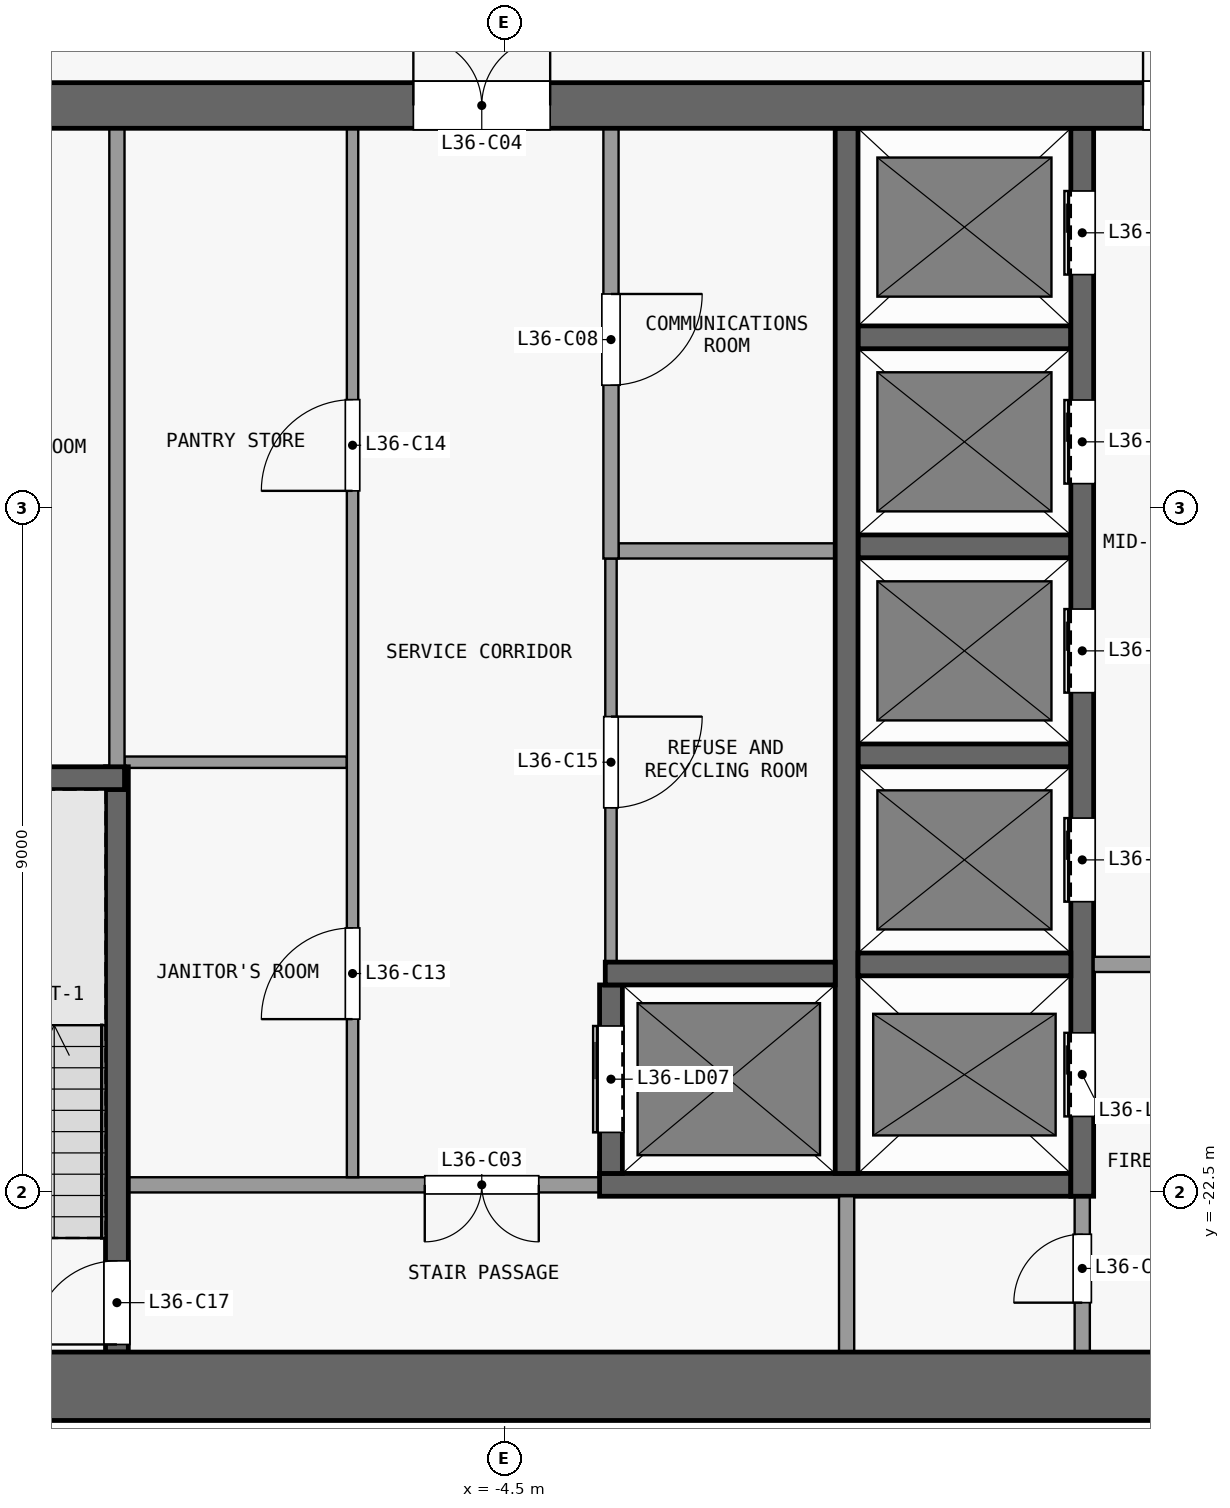
"""IFC4 building model, lengths in metres.
Left out: names, types, materials, properties, quantities, classifications, styles, units other than length and angle.
Written with IfcOpenShell. Run it as: python <this file> out.ifc"""

import sys

from ifc_helpers import new_model, si_unit, direction, frame, frame_2d, origin, place, context, subcontext, project, spatial, rectangle, extrude, element, fill, save


model = new_model("IFC4")
c1 = context("Model", 3, precision=1e-05, world=origin(), true_north=direction((0.0, 1.0)))
c2 = subcontext(c1, "Body", "Model", "MODEL_VIEW")
j1 = project(units=[si_unit("LENGTHUNIT", "METRE"), si_unit("PLANEANGLEUNIT", "RADIAN")], contexts=[c1])
p1 = place(None, origin())
s1 = spatial("IfcSite", under=j1, at=p1, CompositionType="ELEMENT")
p2 = place(p1, origin())
s2 = spatial("IfcBuilding", under=s1, at=p2, CompositionType="ELEMENT")
p3 = place(p2, frame((0.0, 0.0, 149.3)))
s3 = spatial("IfcBuildingStorey", under=s2, at=p3, CompositionType="ELEMENT", Elevation=149.3)
p4 = place(p3, frame((-13.3, -25.05, 0.0), z_axis=(0.0, 0.0, 1.0), x_axis=(1.0, 0.0, 0.0)))
e1 = element("IfcWall", 1, at=p4, inside=s3, PredefinedType="SHEAR", context=c2, shape_type="SweptSolid", body=[
    extrude(rectangle(XDim=26.6, YDim=0.9, at=frame_2d((13.3, 0.0))), origin(), (0.0, 0.0, 1.0), 3.3),
])
p5 = place(p3, frame((-13.3, -8.2, 0.0), z_axis=(0.0, 0.0, 1.0), x_axis=(1.0, 0.0, 0.0)))
e2 = element("IfcWall", 2, at=p5, inside=s3, PredefinedType="SHEAR", context=c2, shape_type="SweptSolid", body=[
    extrude(rectangle(XDim=26.6, YDim=0.6, at=frame_2d((13.3, 0.0))), origin(), (0.0, 0.0, 1.0), 3.3),
])
p6 = place(p5, frame((7.6, 0.0, 0.0)))
e3 = element("IfcOpeningElement", 3, at=p6, cuts=e2, PredefinedType="OPENING", context=c2, shape_type="SweptSolid", body=[
    extrude(rectangle(XDim=1.8, YDim=2.1, at=frame_2d((0.9, 1.05))), frame((0.0, 0.31, 0.0), z_axis=(0.0, -1.0, 0.0), x_axis=(1.0, 0.0, 0.0)), (0.0, 0.0, 1.0), 0.62),
])
p7 = place(p5, frame((17.2, 0.0, 0.0)))
e4 = element("IfcOpeningElement", 4, at=p7, cuts=e2, PredefinedType="OPENING", context=c2, shape_type="SweptSolid", body=[
    extrude(rectangle(XDim=1.8, YDim=2.1, at=frame_2d((0.9, 1.05))), frame((0.0, 0.31, 0.0), z_axis=(0.0, -1.0, 0.0), x_axis=(1.0, 0.0, 0.0)), (0.0, 0.0, 1.0), 0.62),
])
p8 = place(p5, frame((1.525, 0.0, 0.0)))
e5 = element("IfcOpeningElement", 5, at=p8, cuts=e2, PredefinedType="OPENING", context=c2, shape_type="SweptSolid", body=[
    extrude(rectangle(XDim=1.2, YDim=2.1, at=frame_2d((0.6, 1.05))), frame((0.0, 0.31, 0.0), z_axis=(0.0, -1.0, 0.0), x_axis=(1.0, 0.0, 0.0)), (0.0, 0.0, 1.0), 0.62),
])
p9 = place(p5, frame((23.175, 0.0, 0.0)))
e6 = element("IfcOpeningElement", 6, at=p9, cuts=e2, PredefinedType="OPENING", context=c2, shape_type="SweptSolid", body=[
    extrude(rectangle(XDim=0.9, YDim=2.1, at=frame_2d((0.45, 1.05))), frame((0.0, 0.31, 0.0), z_axis=(0.0, -1.0, 0.0), x_axis=(1.0, 0.0, 0.0)), (0.0, 0.0, 1.0), 0.62),
])
p10 = place(p3, frame((-3.25, -22.4, 0.0), z_axis=(0.0, 0.0, 1.0), x_axis=(-1.0, 0.0, 0.0)))
e7 = element("IfcWall", 7, at=p10, inside=s3, PredefinedType="PARTITIONING", context=c2, shape_type="SweptSolid", body=[
    extrude(rectangle(XDim=6.2, YDim=0.2, at=frame_2d((3.1, 0.0))), origin(), (0.0, 0.0, 1.0), 3.3),
])
p11 = place(p10, frame((0.8, 0.0, 0.0)))
e8 = element("IfcOpeningElement", 8, at=p11, cuts=e7, PredefinedType="OPENING", context=c2, shape_type="SweptSolid", body=[
    extrude(rectangle(XDim=1.5, YDim=2.1, at=frame_2d((0.75, 1.05))), frame((0.0, 0.11, 0.0), z_axis=(0.0, -1.0, 0.0), x_axis=(1.0, 0.0, 0.0)), (0.0, 0.0, 1.0), 0.22),
])
p12 = place(p3, frame((-3.25, -22.4, 0.0), z_axis=(0.0, 0.0, 1.0), x_axis=(1.0, 0.0, 0.0)))
e9 = element("IfcWall", 9, at=p12, inside=s3, PredefinedType="SHEAR", context=c2, shape_type="SweptSolid", body=[
    extrude(rectangle(XDim=6.2, YDim=0.3, at=frame_2d((3.1, 0.0))), origin(), (0.0, 0.0, 1.0), 3.3),
])
p13 = place(p3, frame((-3.175, -19.62, 0.0), z_axis=(0.0, 0.0, 1.0), x_axis=(1.0, 0.0, 0.0)))
e10 = element("IfcWall", 10, at=p13, inside=s3, PredefinedType="SHEAR", context=c2, shape_type="SweptSolid", body=[
    extrude(rectangle(XDim=3.025, YDim=0.3, at=frame_2d((1.513, 0.0))), origin(), (0.0, 0.0, 1.0), 3.3),
])
p14 = place(p3, frame((0.15, -19.5, 0.0), z_axis=(0.0, 0.0, 1.0), x_axis=(1.0, 0.0, 0.0)))
e11 = element("IfcWall", 11, at=p14, inside=s3, PredefinedType="SHEAR", context=c2, shape_type="SweptSolid", body=[
    extrude(rectangle(XDim=2.8, YDim=0.3, at=frame_2d((1.4, 0.0))), origin(), (0.0, 0.0, 1.0), 3.3),
])
p15 = place(p3, frame((6.575, -19.5, 0.0), z_axis=(0.0, 0.0, 1.0), x_axis=(-1.0, 0.0, 0.0)))
e12 = element("IfcWall", 12, at=p15, inside=s3, PredefinedType="PARTITIONING", context=c2, shape_type="SweptSolid", body=[
    extrude(rectangle(XDim=3.325, YDim=0.2, at=frame_2d((1.663, 0.0))), origin(), (0.0, 0.0, 1.0), 3.3),
])
p16 = place(p15, frame((1.025, 0.0, 0.0)))
e13 = element("IfcOpeningElement", 13, at=p16, cuts=e12, PredefinedType="OPENING", context=c2, shape_type="SweptSolid", body=[
    extrude(rectangle(XDim=1.5, YDim=2.1, at=frame_2d((0.75, 1.05))), frame((0.0, 0.11, 0.0), z_axis=(0.0, -1.0, 0.0), x_axis=(1.0, 0.0, 0.0)), (0.0, 0.0, 1.0), 0.22),
])
p17 = place(p3, frame((-12.6, -17.05, 0.0), z_axis=(0.0, 0.0, 1.0), x_axis=(1.0, 0.0, 0.0)))
e14 = element("IfcWall", 14, at=p17, inside=s3, PredefinedType="SHEAR", context=c2, shape_type="SweptSolid", body=[
    extrude(rectangle(XDim=3.1, YDim=0.3, at=frame_2d((1.55, 0.0))), origin(), (0.0, 0.0, 1.0), 3.3),
])
p18 = place(p3, frame((-9.5, -16.84, 0.0), z_axis=(0.0, 0.0, 1.0), x_axis=(1.0, 0.0, 0.0)))
e15 = element("IfcWall", 15, at=p18, inside=s3, PredefinedType="PARTITIONING", context=c2, shape_type="SweptSolid", body=[
    extrude(rectangle(XDim=2.925, YDim=0.15, at=frame_2d((1.462, 0.0))), origin(), (0.0, 0.0, 1.0), 3.3),
])
p19 = place(p3, frame((0.15, -16.75, 0.0), z_axis=(0.0, 0.0, 1.0), x_axis=(1.0, 0.0, 0.0)))
e16 = element("IfcWall", 16, at=p19, inside=s3, PredefinedType="SHEAR", context=c2, shape_type="SweptSolid", body=[
    extrude(rectangle(XDim=2.8, YDim=0.3, at=frame_2d((1.4, 0.0))), origin(), (0.0, 0.0, 1.0), 3.3),
])
p20 = place(p3, frame((-3.0, -14.06, 0.0), z_axis=(0.0, 0.0, 1.0), x_axis=(1.0, 0.0, 0.0)))
e17 = element("IfcWall", 17, at=p20, inside=s3, PredefinedType="PARTITIONING", context=c2, shape_type="SweptSolid", body=[
    extrude(rectangle(XDim=2.85, YDim=0.2, at=frame_2d((1.425, 0.0))), origin(), (0.0, 0.0, 1.0), 3.3),
])
for number, where, z_axis, x_axis in (
    (18, (0.15, -14.0, 0.0), (0.0, 0.0, 1.0), (1.0, 0.0, 0.0)),
    (19, (0.15, -11.25, 0.0), (0.0, 0.0, 1.0), (1.0, 0.0, 0.0)),
):
    element("IfcWall", number, at=place(p3, frame(where, z_axis=z_axis, x_axis=x_axis)), inside=s3, PredefinedType="SHEAR", context=c2, shape_type="SweptSolid", body=[
        extrude(rectangle(XDim=2.8, YDim=0.3, at=frame_2d((1.4, 0.0))), origin(), (0.0, 0.0, 1.0), 3.3),
    ])
p21 = place(p3, frame((-9.6, -24.6, 0.0), z_axis=(0.0, 0.0, 1.0), x_axis=(0.0, 1.0, 0.0)))
e20 = element("IfcWall", 20, at=p21, inside=s3, PredefinedType="SHEAR", context=c2, shape_type="SweptSolid", body=[
    extrude(rectangle(XDim=7.7, YDim=0.3, at=frame_2d((3.85, 0.0))), origin(), (0.0, 0.0, 1.0), 3.3),
])
p22 = place(p21, frame((0.1, 0.0, 0.0)))
e21 = element("IfcOpeningElement", 21, at=p22, cuts=e20, PredefinedType="OPENING", context=c2, shape_type="SweptSolid", body=[
    extrude(rectangle(XDim=1.1, YDim=2.1, at=frame_2d((0.55, 1.05))), frame((0.0, 0.16, 0.0), z_axis=(0.0, -1.0, 0.0), x_axis=(1.0, 0.0, 0.0)), (0.0, 0.0, 1.0), 0.32),
])
p23 = place(p3, frame((-9.6, -16.9, 0.0), z_axis=(0.0, 0.0, 1.0), x_axis=(0.0, 1.0, 0.0)))
e22 = element("IfcWall", 22, at=p23, inside=s3, PredefinedType="PARTITIONING", context=c2, shape_type="SweptSolid", body=[
    extrude(rectangle(XDim=8.4, YDim=0.2, at=frame_2d((4.2, 0.0))), origin(), (0.0, 0.0, 1.0), 3.3),
])
p24 = place(p3, frame((-6.5, -22.3, 0.0), z_axis=(0.0, 0.0, 1.0), x_axis=(0.0, 1.0, 0.0)))
e23 = element("IfcWall", 23, at=p24, inside=s3, PredefinedType="PARTITIONING", context=c2, shape_type="SweptSolid", body=[
    extrude(rectangle(XDim=13.8, YDim=0.15, at=frame_2d((6.9, 0.0))), origin(), (0.0, 0.0, 1.0), 3.3),
])
p25 = place(p24, frame((2.08, 0.0, 0.0)))
e24 = element("IfcOpeningElement", 24, at=p25, cuts=e23, PredefinedType="OPENING", context=c2, shape_type="SweptSolid", body=[
    extrude(rectangle(XDim=1.2, YDim=2.1, at=frame_2d((0.6, 1.05))), frame((0.0, 0.085, 0.0), z_axis=(0.0, -1.0, 0.0), x_axis=(1.0, 0.0, 0.0)), (0.0, 0.0, 1.0), 0.17),
])
p26 = place(p24, frame((9.03, 0.0, 0.0)))
e25 = element("IfcOpeningElement", 25, at=p26, cuts=e23, PredefinedType="OPENING", context=c2, shape_type="SweptSolid", body=[
    extrude(rectangle(XDim=1.2, YDim=2.1, at=frame_2d((0.6, 1.05))), frame((0.0, 0.085, 0.0), z_axis=(0.0, -1.0, 0.0), x_axis=(1.0, 0.0, 0.0)), (0.0, 0.0, 1.0), 0.17),
])
p27 = place(p3, frame((-3.1, -22.25, 0.0), z_axis=(0.0, 0.0, 1.0), x_axis=(0.0, 1.0, 0.0)))
e26 = element("IfcWall", 26, at=p27, inside=s3, PredefinedType="SHEAR", context=c2, shape_type="SweptSolid", body=[
    extrude(rectangle(XDim=2.48, YDim=0.3, at=frame_2d((1.24, 0.0))), origin(), (0.0, 0.0, 1.0), 3.3),
])
p28 = place(p27, frame((0.54, 0.0, 0.0)))
e27 = element("IfcOpeningElement", 27, at=p28, cuts=e26, PredefinedType="OPENING", context=c2, shape_type="SweptSolid", body=[
    extrude(rectangle(XDim=1.4, YDim=2.1, at=frame_2d((0.7, 1.05))), frame((0.0, 0.16, 0.0), z_axis=(0.0, -1.0, 0.0), x_axis=(1.0, 0.0, 0.0)), (0.0, 0.0, 1.0), 0.32),
])
p29 = place(p3, frame((-3.1, -14.16, 0.0), z_axis=(0.0, 0.0, 1.0), x_axis=(0.0, -1.0, 0.0)))
e28 = element("IfcWall", 28, at=p29, inside=s3, PredefinedType="PARTITIONING", context=c2, shape_type="SweptSolid", body=[
    extrude(rectangle(XDim=5.31, YDim=0.15, at=frame_2d((2.655, 0.0))), origin(), (0.0, 0.0, 1.0), 3.3),
])
p30 = place(p29, frame((2.08, 0.0, 0.0)))
e29 = element("IfcOpeningElement", 29, at=p30, cuts=e28, PredefinedType="OPENING", context=c2, shape_type="SweptSolid", body=[
    extrude(rectangle(XDim=1.2, YDim=2.1, at=frame_2d((0.6, 1.05))), frame((0.0, 0.085, 0.0), z_axis=(0.0, -1.0, 0.0), x_axis=(1.0, 0.0, 0.0)), (0.0, 0.0, 1.0), 0.17),
])
p31 = place(p3, frame((-3.1, -8.5, 0.0), z_axis=(0.0, 0.0, 1.0), x_axis=(0.0, -1.0, 0.0)))
e30 = element("IfcWall", 30, at=p31, inside=s3, PredefinedType="PARTITIONING", context=c2, shape_type="SweptSolid", body=[
    extrude(rectangle(XDim=5.66, YDim=0.2, at=frame_2d((2.83, 0.0))), origin(), (0.0, 0.0, 1.0), 3.3),
])
p32 = place(p31, frame((2.18, 0.0, 0.0)))
e31 = element("IfcOpeningElement", 31, at=p32, cuts=e30, PredefinedType="OPENING", context=c2, shape_type="SweptSolid", body=[
    extrude(rectangle(XDim=1.2, YDim=2.1, at=frame_2d((0.6, 1.05))), frame((0.0, 0.11, 0.0), z_axis=(0.0, -1.0, 0.0), x_axis=(1.0, 0.0, 0.0)), (0.0, 0.0, 1.0), 0.22),
])
p33 = place(p3, frame((0.0, -24.6, 0.0), z_axis=(0.0, 0.0, 1.0), x_axis=(0.0, 1.0, 0.0)))
e32 = element("IfcWall", 32, at=p33, inside=s3, PredefinedType="PARTITIONING", context=c2, shape_type="SweptSolid", body=[
    extrude(rectangle(XDim=2.05, YDim=0.2, at=frame_2d((1.025, 0.0))), origin(), (0.0, 0.0, 1.0), 3.3),
])
p34 = place(p3, frame((0.0, -22.25, 0.0), z_axis=(0.0, 0.0, 1.0), x_axis=(0.0, 1.0, 0.0)))
e33 = element("IfcWall", 33, at=p34, inside=s3, PredefinedType="SHEAR", context=c2, shape_type="SweptSolid", body=[
    extrude(rectangle(XDim=13.75, YDim=0.3, at=frame_2d((6.875, 0.0))), origin(), (0.0, 0.0, 1.0), 3.3),
])
p35 = place(p3, frame((3.1, -24.6, 0.0), z_axis=(0.0, 0.0, 1.0), x_axis=(0.0, 1.0, 0.0)))
e34 = element("IfcWall", 34, at=p35, inside=s3, PredefinedType="PARTITIONING", context=c2, shape_type="SweptSolid", body=[
    extrude(rectangle(XDim=2.05, YDim=0.2, at=frame_2d((1.025, 0.0))), origin(), (0.0, 0.0, 1.0), 3.3),
])
p36 = place(p35, frame((0.65, 0.0, 0.0)))
e35 = element("IfcOpeningElement", 35, at=p36, cuts=e34, PredefinedType="OPENING", context=c2, shape_type="SweptSolid", body=[
    extrude(rectangle(XDim=0.9, YDim=2.1, at=frame_2d((0.45, 1.05))), frame((0.0, 0.11, 0.0), z_axis=(0.0, -1.0, 0.0), x_axis=(1.0, 0.0, 0.0)), (0.0, 0.0, 1.0), 0.22),
])
p37 = place(p3, frame((3.1, -22.55, 0.0), z_axis=(0.0, 0.0, 1.0), x_axis=(0.0, 1.0, 0.0)))
e36 = element("IfcWall", 36, at=p37, inside=s3, PredefinedType="SHEAR", context=c2, shape_type="SweptSolid", body=[
    extrude(rectangle(XDim=14.05, YDim=0.3, at=frame_2d((7.025, 0.0))), origin(), (0.0, 0.0, 1.0), 3.3),
])
p38 = place(p37, frame((1.05, 0.0, 0.0)))
e37 = element("IfcOpeningElement", 37, at=p38, cuts=e36, PredefinedType="OPENING", context=c2, shape_type="SweptSolid", body=[
    extrude(rectangle(XDim=1.1, YDim=2.1, at=frame_2d((0.55, 1.05))), frame((0.0, 0.16, 0.0), z_axis=(0.0, -1.0, 0.0), x_axis=(1.0, 0.0, 0.0)), (0.0, 0.0, 1.0), 0.32),
])
p39 = place(p37, frame((3.875, 0.0, 0.0)))
e38 = element("IfcOpeningElement", 38, at=p39, cuts=e36, PredefinedType="OPENING", context=c2, shape_type="SweptSolid", body=[
    extrude(rectangle(XDim=1.1, YDim=2.1, at=frame_2d((0.55, 1.05))), frame((0.0, 0.16, 0.0), z_axis=(0.0, -1.0, 0.0), x_axis=(1.0, 0.0, 0.0)), (0.0, 0.0, 1.0), 0.32),
])
p40 = place(p37, frame((6.625, 0.0, 0.0)))
e39 = element("IfcOpeningElement", 39, at=p40, cuts=e36, PredefinedType="OPENING", context=c2, shape_type="SweptSolid", body=[
    extrude(rectangle(XDim=1.1, YDim=2.1, at=frame_2d((0.55, 1.05))), frame((0.0, 0.16, 0.0), z_axis=(0.0, -1.0, 0.0), x_axis=(1.0, 0.0, 0.0)), (0.0, 0.0, 1.0), 0.32),
])
p41 = place(p37, frame((9.375, 0.0, 0.0)))
e40 = element("IfcOpeningElement", 40, at=p41, cuts=e36, PredefinedType="OPENING", context=c2, shape_type="SweptSolid", body=[
    extrude(rectangle(XDim=1.1, YDim=2.1, at=frame_2d((0.55, 1.05))), frame((0.0, 0.16, 0.0), z_axis=(0.0, -1.0, 0.0), x_axis=(1.0, 0.0, 0.0)), (0.0, 0.0, 1.0), 0.32),
])
p42 = place(p37, frame((12.125, 0.0, 0.0)))
e41 = element("IfcOpeningElement", 41, at=p42, cuts=e36, PredefinedType="OPENING", context=c2, shape_type="SweptSolid", body=[
    extrude(rectangle(XDim=1.1, YDim=2.1, at=frame_2d((0.55, 1.05))), frame((0.0, 0.16, 0.0), z_axis=(0.0, -1.0, 0.0), x_axis=(1.0, 0.0, 0.0)), (0.0, 0.0, 1.0), 0.32),
])
p43 = place(p38, origin())
e42 = element("IfcDoor", 42, at=p43, inside=s3, OperationType="DOUBLE_DOOR_SLIDING", PredefinedType="DOOR", context=c2, shape_type="SweptSolid", body=[
    extrude(rectangle(XDim=1.1, YDim=2.1, at=frame_2d((0.55, 1.05))), frame((0.0, 0.025, 0.0), z_axis=(0.0, -1.0, 0.0), x_axis=(1.0, 0.0, 0.0)), (0.0, 0.0, 1.0), 0.05),
])
fill(e37, e42)
p44 = place(p39, origin())
e43 = element("IfcDoor", 43, at=p44, inside=s3, OperationType="DOUBLE_DOOR_SLIDING", PredefinedType="DOOR", context=c2, shape_type="SweptSolid", body=[
    extrude(rectangle(XDim=1.1, YDim=2.1, at=frame_2d((0.55, 1.05))), frame((0.0, 0.025, 0.0), z_axis=(0.0, -1.0, 0.0), x_axis=(1.0, 0.0, 0.0)), (0.0, 0.0, 1.0), 0.05),
])
fill(e38, e43)
p45 = place(p40, origin())
e44 = element("IfcDoor", 44, at=p45, inside=s3, OperationType="DOUBLE_DOOR_SLIDING", PredefinedType="DOOR", context=c2, shape_type="SweptSolid", body=[
    extrude(rectangle(XDim=1.1, YDim=2.1, at=frame_2d((0.55, 1.05))), frame((0.0, 0.025, 0.0), z_axis=(0.0, -1.0, 0.0), x_axis=(1.0, 0.0, 0.0)), (0.0, 0.0, 1.0), 0.05),
])
fill(e39, e44)
p46 = place(p41, origin())
e45 = element("IfcDoor", 45, at=p46, inside=s3, OperationType="DOUBLE_DOOR_SLIDING", PredefinedType="DOOR", context=c2, shape_type="SweptSolid", body=[
    extrude(rectangle(XDim=1.1, YDim=2.1, at=frame_2d((0.55, 1.05))), frame((0.0, 0.025, 0.0), z_axis=(0.0, -1.0, 0.0), x_axis=(1.0, 0.0, 0.0)), (0.0, 0.0, 1.0), 0.05),
])
fill(e40, e45)
p47 = place(p42, origin())
e46 = element("IfcDoor", 46, at=p47, inside=s3, OperationType="DOUBLE_DOOR_SLIDING", PredefinedType="DOOR", context=c2, shape_type="SweptSolid", body=[
    extrude(rectangle(XDim=1.1, YDim=2.1, at=frame_2d((0.55, 1.05))), frame((0.0, 0.025, 0.0), z_axis=(0.0, -1.0, 0.0), x_axis=(1.0, 0.0, 0.0)), (0.0, 0.0, 1.0), 0.05),
])
fill(e41, e46)
p48 = place(p28, origin())
e47 = element("IfcDoor", 47, at=p48, inside=s3, OperationType="DOUBLE_DOOR_SLIDING", PredefinedType="DOOR", context=c2, shape_type="SweptSolid", body=[
    extrude(rectangle(XDim=1.4, YDim=2.1, at=frame_2d((0.7, 1.05))), frame((0.0, 0.025, 0.0), z_axis=(0.0, -1.0, 0.0), x_axis=(1.0, 0.0, 0.0)), (0.0, 0.0, 1.0), 0.05),
])
fill(e27, e47)
p49 = place(p11, origin())
e48 = element("IfcDoor", 48, at=p49, inside=s3, OperationType="DOUBLE_DOOR_SINGLE_SWING", PredefinedType="DOOR", context=c2, shape_type="SweptSolid", body=[
    extrude(rectangle(XDim=1.5, YDim=2.1, at=frame_2d((0.75, 1.05))), frame((0.0, 0.025, 0.0), z_axis=(0.0, -1.0, 0.0), x_axis=(1.0, 0.0, 0.0)), (0.0, 0.0, 1.0), 0.05),
])
fill(e8, e48)
p50 = place(p6, origin())
e49 = element("IfcDoor", 49, at=p50, inside=s3, OperationType="DOUBLE_DOOR_SINGLE_SWING", PredefinedType="DOOR", context=c2, shape_type="SweptSolid", body=[
    extrude(rectangle(XDim=1.8, YDim=2.1, at=frame_2d((0.9, 1.05))), frame((0.0, 0.025, 0.0), z_axis=(0.0, -1.0, 0.0), x_axis=(1.0, 0.0, 0.0)), (0.0, 0.0, 1.0), 0.05),
])
fill(e3, e49)
p51 = place(p7, origin())
e50 = element("IfcDoor", 50, at=p51, inside=s3, OperationType="DOUBLE_DOOR_SINGLE_SWING", PredefinedType="DOOR", context=c2, shape_type="SweptSolid", body=[
    extrude(rectangle(XDim=1.8, YDim=2.1, at=frame_2d((0.9, 1.05))), frame((0.0, 0.025, 0.0), z_axis=(0.0, -1.0, 0.0), x_axis=(1.0, 0.0, 0.0)), (0.0, 0.0, 1.0), 0.05),
])
fill(e4, e50)
p52 = place(p36, origin())
e51 = element("IfcDoor", 51, at=p52, inside=s3, OperationType="SINGLE_SWING_LEFT", PredefinedType="DOOR", context=c2, shape_type="SweptSolid", body=[
    extrude(rectangle(XDim=0.9, YDim=2.1, at=frame_2d((0.45, 1.05))), frame((0.0, 0.025, 0.0), z_axis=(0.0, -1.0, 0.0), x_axis=(1.0, 0.0, 0.0)), (0.0, 0.0, 1.0), 0.05),
])
fill(e35, e51)
p53 = place(p32, origin())
e52 = element("IfcDoor", 52, at=p53, inside=s3, OperationType="SINGLE_SWING_LEFT", PredefinedType="DOOR", context=c2, shape_type="SweptSolid", body=[
    extrude(rectangle(XDim=1.2, YDim=2.1, at=frame_2d((0.6, 1.05))), frame((0.0, 0.025, 0.0), z_axis=(0.0, -1.0, 0.0), x_axis=(1.0, 0.0, 0.0)), (0.0, 0.0, 1.0), 0.05),
])
fill(e31, e52)
p54 = place(p25, origin())
e53 = element("IfcDoor", 53, at=p54, inside=s3, OperationType="SINGLE_SWING_LEFT", PredefinedType="DOOR", context=c2, shape_type="SweptSolid", body=[
    extrude(rectangle(XDim=1.2, YDim=2.1, at=frame_2d((0.6, 1.05))), frame((0.0, 0.025, 0.0), z_axis=(0.0, -1.0, 0.0), x_axis=(1.0, 0.0, 0.0)), (0.0, 0.0, 1.0), 0.05),
])
fill(e24, e53)
p55 = place(p26, origin())
e54 = element("IfcDoor", 54, at=p55, inside=s3, OperationType="SINGLE_SWING_LEFT", PredefinedType="DOOR", context=c2, shape_type="SweptSolid", body=[
    extrude(rectangle(XDim=1.2, YDim=2.1, at=frame_2d((0.6, 1.05))), frame((0.0, 0.025, 0.0), z_axis=(0.0, -1.0, 0.0), x_axis=(1.0, 0.0, 0.0)), (0.0, 0.0, 1.0), 0.05),
])
fill(e25, e54)
p56 = place(p30, origin())
e55 = element("IfcDoor", 55, at=p56, inside=s3, OperationType="SINGLE_SWING_LEFT", PredefinedType="DOOR", context=c2, shape_type="SweptSolid", body=[
    extrude(rectangle(XDim=1.2, YDim=2.1, at=frame_2d((0.6, 1.05))), frame((0.0, 0.025, 0.0), z_axis=(0.0, -1.0, 0.0), x_axis=(1.0, 0.0, 0.0)), (0.0, 0.0, 1.0), 0.05),
])
fill(e29, e55)
p57 = place(p22, origin())
e56 = element("IfcDoor", 56, at=p57, inside=s3, OperationType="SINGLE_SWING_LEFT", PredefinedType="DOOR", context=c2, shape_type="SweptSolid", body=[
    extrude(rectangle(XDim=1.1, YDim=2.1, at=frame_2d((0.55, 1.05))), frame((0.0, 0.025, 0.0), z_axis=(0.0, -1.0, 0.0), x_axis=(1.0, 0.0, 0.0)), (0.0, 0.0, 1.0), 0.05),
])
fill(e21, e56)
save(model, sys.argv[1])
